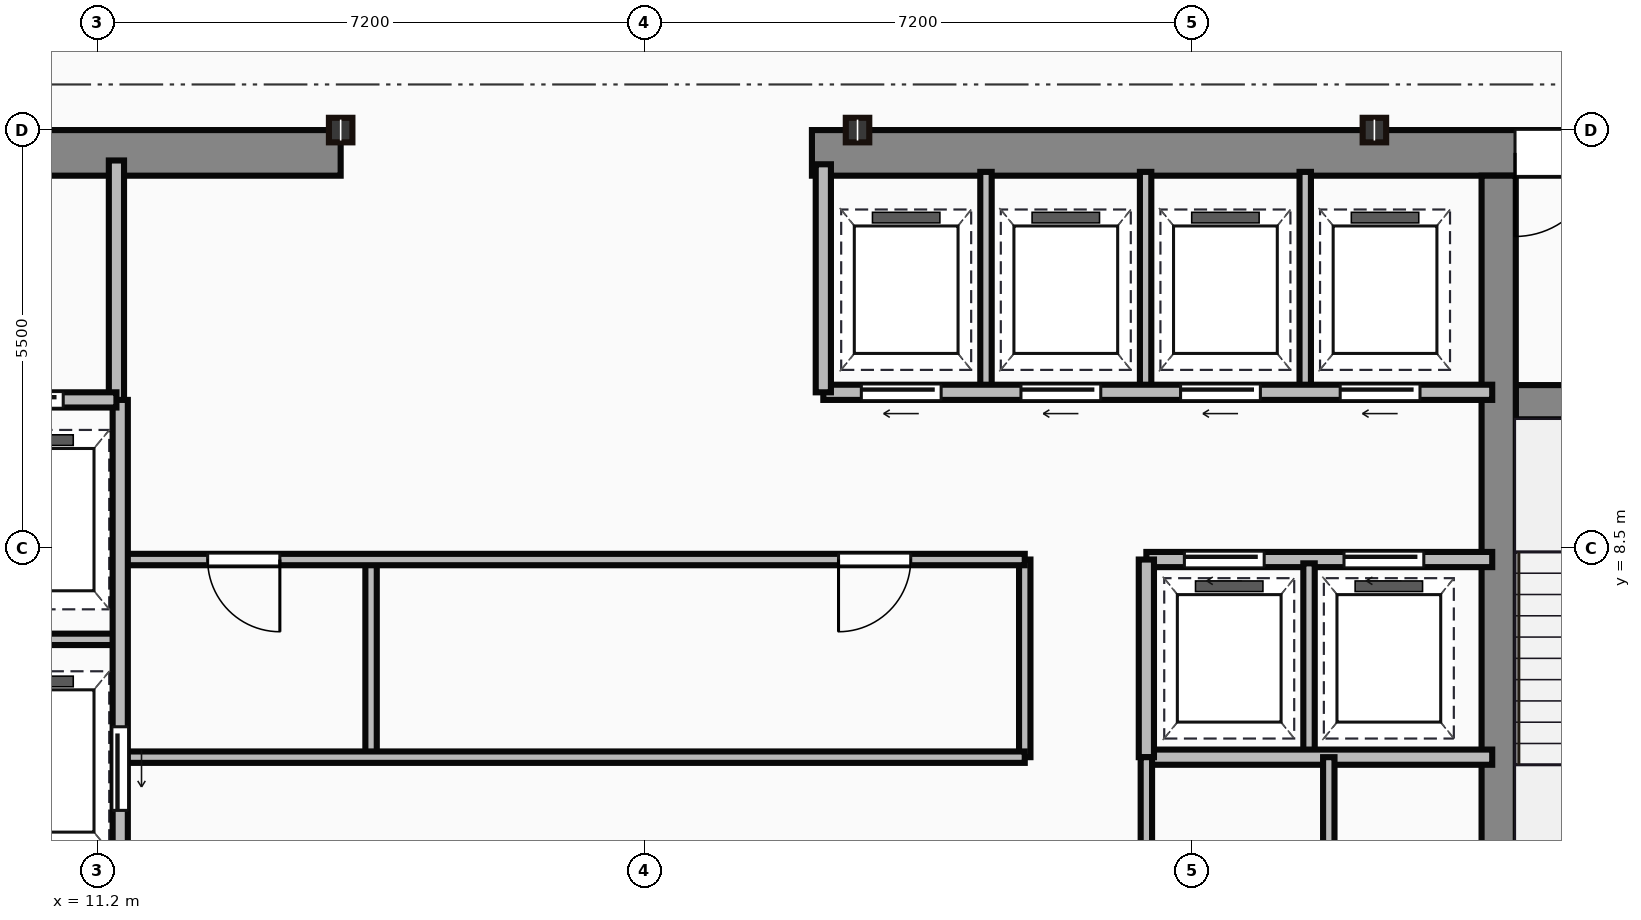
"""IFC4 building model, lengths in metres.
Left out: names, types, materials, properties, quantities, classifications, styles, units other than length and angle.
Written with IfcOpenShell. Run it as: python <this file> out.ifc"""

import sys

from ifc_helpers import new_model, si_unit, direction, frame, frame_2d, origin, origin_2d, place, context, subcontext, project, spatial, rectangle, i_section, extrude, source, transform, mapped, element, fill, save


model = new_model("IFC4")
c1 = context("Model", 3, precision=1e-05, world=origin(), true_north=direction((0.0, 1.0)))
c2 = subcontext(c1, "Body", "Model", "MODEL_VIEW")
j1 = project(units=[si_unit("LENGTHUNIT", "METRE"), si_unit("PLANEANGLEUNIT", "RADIAN")], contexts=[c1])
p1 = place(None, origin())
s1 = spatial("IfcSite", under=j1, at=p1, CompositionType="ELEMENT")
p2 = place(p1, origin())
s2 = spatial("IfcBuilding", under=s1, at=p2, CompositionType="ELEMENT")
p3 = place(p2, frame((0.0, 0.0, 206.85)))
s3 = spatial("IfcBuildingStorey", under=s2, at=p3, CompositionType="ELEMENT", Elevation=206.85)
m1 = source(origin(), c2, "Body", "SweptSolid", [
    extrude(rectangle(XDim=9.1, YDim=0.6, at=frame_2d((4.55, 0.0))), origin(), (0.0, 0.0, 1.0), 3.65),
])
p4 = place(p3, frame((5.3, 13.7, 0.0), z_axis=(0.0, 0.0, 1.0), x_axis=(1.0, 0.0, 0.0)))
e1 = element("IfcWall", 1, at=p4, inside=s3, PredefinedType="SHEAR", context=c2, shape_type="MappedRepresentation", body=[
    mapped(m1, transform((0.0, 0.0, 0.0))),
])
p5 = place(p4, frame((4.1, 0.0, 0.0)))
e2 = element("IfcOpeningElement", 2, at=p5, cuts=e1, PredefinedType="OPENING", context=c2, shape_type="SweptSolid", body=[
    extrude(rectangle(XDim=1.1, YDim=2.15, at=frame_2d((0.55, 1.075))), frame((0.0, 0.31, 0.0), z_axis=(0.0, -1.0, 0.0), x_axis=(1.0, 0.0, 0.0)), (0.0, 0.0, 1.0), 0.62),
])
m2 = source(origin(), c2, "Body", "SweptSolid", [
    extrude(rectangle(XDim=12.6, YDim=0.6, at=frame_2d((6.3, 0.0))), origin(), (0.0, 0.0, 1.0), 3.65),
])
p6 = place(p3, frame((20.6, 13.7, 0.0), z_axis=(0.0, 0.0, 1.0), x_axis=(1.0, 0.0, 0.0)))
e3 = element("IfcWall", 3, at=p6, inside=s3, PredefinedType="SHEAR", context=c2, shape_type="MappedRepresentation", body=[
    mapped(m2, transform((0.0, 0.0, 0.0))),
])
p7 = place(p6, frame((9.25, 0.0, 0.0)))
e4 = element("IfcOpeningElement", 4, at=p7, cuts=e3, PredefinedType="OPENING", context=c2, shape_type="SweptSolid", body=[
    extrude(rectangle(XDim=1.1, YDim=2.15, at=frame_2d((0.55, 1.075))), frame((0.0, 0.31, 0.0), z_axis=(0.0, -1.0, 0.0), x_axis=(1.0, 0.0, 0.0)), (0.0, 0.0, 1.0), 0.62),
])
m3 = source(origin(), c2, "Body", "SweptSolid", [
    extrude(rectangle(XDim=12.5, YDim=0.45, at=frame_2d((6.25, 0.0))), origin(), (0.0, 0.0, 1.0), 3.65),
])
p8 = place(p3, frame((29.635, 0.9, 0.0), z_axis=(0.0, 0.0, 1.0), x_axis=(0.0, 1.0, 0.0)))
e5 = element("IfcWall", 5, at=p8, inside=s3, PredefinedType="SHEAR", context=c2, shape_type="MappedRepresentation", body=[
    mapped(m3, transform((0.0, 0.0, 0.0))),
])
m4 = source(origin(), c2, "Body", "SweptSolid", [
    extrude(rectangle(XDim=3.39, YDim=0.45, at=frame_2d((1.695, 0.0))), origin(), (0.0, 0.0, 1.0), 3.65),
])
p9 = place(p3, frame((29.86, 10.42, 0.0), z_axis=(0.0, 0.0, 1.0), x_axis=(1.0, 0.0, 0.0)))
e6 = element("IfcWall", 6, at=p9, inside=s3, PredefinedType="SHEAR", context=c2, shape_type="MappedRepresentation", body=[
    mapped(m4, transform((0.0, 0.0, 0.0))),
])
p10 = place(p9, frame((1.1, 0.0, 0.0)))
e7 = element("IfcOpeningElement", 7, at=p10, cuts=e6, PredefinedType="OPENING", context=c2, shape_type="SweptSolid", body=[
    extrude(rectangle(XDim=1.1, YDim=2.15, at=frame_2d((0.55, 1.075))), frame((0.0, 0.235, 0.0), z_axis=(0.0, -1.0, 0.0), x_axis=(1.0, 0.0, 0.0)), (0.0, 0.0, 1.0), 0.47),
])
m5 = source(origin(), c2, "Body", "SweptSolid", [
    extrude(i_section(OverallWidth=0.309, OverallDepth=0.323, WebThickness=0.014, FlangeThickness=0.023, at=origin_2d()), origin(), (0.0, 0.0, 1.0), 3.65),
])
for number, where, z_axis, x_axis in (
    (8, (14.4, 14.0, 0.0), (0.0, 0.0, 1.0), (1.0, 0.0, 0.0)),
    (9, (21.2, 14.0, 0.0), (0.0, 0.0, 1.0), (1.0, 0.0, 0.0)),
    (10, (28.0, 14.0, 0.0), (0.0, 0.0, 1.0), (1.0, 0.0, 0.0)),
):
    element("IfcColumn", number, at=place(p3, frame(where, z_axis=z_axis, x_axis=x_axis)), inside=s3, PredefinedType="COLUMN", context=c2, shape_type="MappedRepresentation", body=[
        mapped(m5, transform((0.0, 0.0, 0.0))),
    ])
m6 = source(origin(), c2, "Body", "SweptSolid", [
    extrude(rectangle(XDim=3.18, YDim=0.2, at=frame_2d((1.59, 0.0))), origin(), (0.0, 0.0, 1.0), 3.4),
])
p11 = place(p3, frame((11.45, 10.42, 0.0), z_axis=(0.0, 0.0, 1.0), x_axis=(0.0, 1.0, 0.0)))
e11 = element("IfcWall", 11, at=p11, inside=s3, PredefinedType="PARTITIONING", context=c2, shape_type="MappedRepresentation", body=[
    mapped(m6, transform((0.0, 0.0, 0.0))),
])
m7 = source(origin(), c2, "Body", "SweptSolid", [
    extrude(rectangle(XDim=2.35, YDim=0.2, at=frame_2d((1.175, 0.0))), origin(), (0.0, 0.0, 1.0), 3.4),
])
p12 = place(p3, frame((9.1, 10.45, 0.0), z_axis=(0.0, 0.0, 1.0), x_axis=(1.0, 0.0, 0.0)))
e12 = element("IfcWall", 12, at=p12, inside=s3, PredefinedType="PARTITIONING", context=c2, shape_type="MappedRepresentation", body=[
    mapped(m7, transform((0.0, 0.0, 0.0))),
])
p13 = place(p12, frame((0.55, 0.0, 0.0)))
e13 = element("IfcOpeningElement", 13, at=p13, cuts=e12, PredefinedType="OPENING", context=c2, shape_type="SweptSolid", body=[
    extrude(rectangle(XDim=1.1, YDim=2.15, at=frame_2d((0.55, 1.075))), frame((0.0, 0.11, 0.0), z_axis=(0.0, -1.0, 0.0), x_axis=(1.0, 0.0, 0.0)), (0.0, 0.0, 1.0), 0.22),
])
m8 = source(origin(), c2, "Body", "SweptSolid", [
    extrude(rectangle(XDim=9.6, YDim=0.2, at=frame_2d((4.8, 0.0))), origin(), (0.0, 0.0, 1.0), 3.4),
])
p14 = place(p3, frame((11.5, 0.85, 0.0), z_axis=(0.0, 0.0, 1.0), x_axis=(0.0, 1.0, 0.0)))
e14 = element("IfcWall", 14, at=p14, inside=s3, PredefinedType="PARTITIONING", context=c2, shape_type="MappedRepresentation", body=[
    mapped(m8, transform((0.0, 0.0, 0.0))),
])
p15 = place(p14, frame((4.2, 0.0, 0.0)))
e15 = element("IfcOpeningElement", 15, at=p15, cuts=e14, PredefinedType="OPENING", context=c2, shape_type="SweptSolid", body=[
    extrude(rectangle(XDim=1.1, YDim=2.15, at=frame_2d((0.55, 1.075))), frame((0.0, 0.11, 0.0), z_axis=(0.0, -1.0, 0.0), x_axis=(1.0, 0.0, 0.0)), (0.0, 0.0, 1.0), 0.22),
])
p16 = place(p14, frame((0.9, 0.0, 0.0)))
e16 = element("IfcOpeningElement", 16, at=p16, cuts=e14, PredefinedType="OPENING", context=c2, shape_type="SweptSolid", body=[
    extrude(rectangle(XDim=1.2, YDim=2.15, at=frame_2d((0.6, 1.075))), frame((0.0, 0.11, 0.0), z_axis=(0.0, -1.0, 0.0), x_axis=(1.0, 0.0, 0.0)), (0.0, 0.0, 1.0), 0.22),
])
m9 = source(origin(), c2, "Body", "SweptSolid", [
    extrude(rectangle(XDim=2.4, YDim=0.15, at=frame_2d((1.2, 0.0))), origin(), (0.0, 0.0, 1.0), 3.4),
])
p17 = place(p3, frame((9.1, 7.3, 0.0), z_axis=(0.0, 0.0, 1.0), x_axis=(1.0, 0.0, 0.0)))
e17 = element("IfcWall", 17, at=p17, inside=s3, PredefinedType="PARTITIONING", context=c2, shape_type="MappedRepresentation", body=[
    mapped(m9, transform((0.0, 0.0, 0.0))),
])
m10 = source(origin(), c2, "Body", "SweptSolid", [
    extrude(rectangle(XDim=11.85, YDim=0.15, at=frame_2d((5.925, 0.0))), origin(), (0.0, 0.0, 1.0), 3.4),
])
p18 = place(p3, frame((11.55, 5.75, 0.0), z_axis=(0.0, 0.0, 1.0), x_axis=(1.0, 0.0, 0.0)))
e18 = element("IfcWall", 18, at=p18, inside=s3, PredefinedType="PARTITIONING", context=c2, shape_type="MappedRepresentation", body=[
    mapped(m10, transform((0.0, 0.0, 0.0))),
])
p19 = place(p3, frame((11.55, 8.35, 0.0), z_axis=(0.0, 0.0, 1.0), x_axis=(1.0, 0.0, 0.0)))
e19 = element("IfcWall", 19, at=p19, inside=s3, PredefinedType="PARTITIONING", context=c2, shape_type="MappedRepresentation", body=[
    mapped(m10, transform((0.0, 0.0, 0.0))),
])
p20 = place(p19, frame((1.1, 0.0, 0.0)))
e20 = element("IfcOpeningElement", 20, at=p20, cuts=e19, PredefinedType="OPENING", context=c2, shape_type="SweptSolid", body=[
    extrude(rectangle(XDim=0.95, YDim=2.15, at=frame_2d((0.475, 1.075))), frame((0.0, 0.085, 0.0), z_axis=(0.0, -1.0, 0.0), x_axis=(1.0, 0.0, 0.0)), (0.0, 0.0, 1.0), 0.17),
])
p21 = place(p19, frame((9.4, 0.0, 0.0)))
e21 = element("IfcOpeningElement", 21, at=p21, cuts=e19, PredefinedType="OPENING", context=c2, shape_type="SweptSolid", body=[
    extrude(rectangle(XDim=0.95, YDim=2.15, at=frame_2d((0.475, 1.075))), frame((0.0, 0.085, 0.0), z_axis=(0.0, -1.0, 0.0), x_axis=(1.0, 0.0, 0.0)), (0.0, 0.0, 1.0), 0.17),
])
m11 = source(origin(), c2, "Body", "SweptSolid", [
    extrude(rectangle(XDim=2.6, YDim=0.15, at=frame_2d((1.3, 0.0))), origin(), (0.0, 0.0, 1.0), 3.4),
])
p22 = place(p3, frame((23.4, 5.75, 0.0), z_axis=(0.0, 0.0, 1.0), x_axis=(0.0, 1.0, 0.0)))
e22 = element("IfcWall", 22, at=p22, inside=s3, PredefinedType="PARTITIONING", context=c2, shape_type="MappedRepresentation", body=[
    mapped(m11, transform((0.0, 0.0, 0.0))),
])
m12 = source(origin(), c2, "Body", "SweptSolid", [
    extrude(rectangle(XDim=2.5, YDim=0.15, at=frame_2d((1.25, 0.0))), origin(), (0.0, 0.0, 1.0), 3.4),
])
p23 = place(p3, frame((14.8, 5.8, 0.0), z_axis=(0.0, 0.0, 1.0), x_axis=(0.0, 1.0, 0.0)))
e23 = element("IfcWall", 23, at=p23, inside=s3, PredefinedType="PARTITIONING", context=c2, shape_type="MappedRepresentation", body=[
    mapped(m12, transform((0.0, 0.0, 0.0))),
])
m13 = source(origin(), c2, "Body", "SweptSolid", [
    extrude(rectangle(XDim=8.8, YDim=0.2, at=frame_2d((4.4, 0.0))), origin(), (0.0, 0.0, 1.0), 3.4),
])
p24 = place(p3, frame((20.75, 10.55, 0.0), z_axis=(0.0, 0.0, 1.0), x_axis=(1.0, 0.0, 0.0)))
e24 = element("IfcWall", 24, at=p24, inside=s3, PredefinedType="PARTITIONING", context=c2, shape_type="MappedRepresentation", body=[
    mapped(m13, transform((0.0, 0.0, 0.0))),
])
p25 = place(p24, frame((0.5, 0.0, 0.0)))
e25 = element("IfcOpeningElement", 25, at=p25, cuts=e24, PredefinedType="OPENING", context=c2, shape_type="SweptSolid", body=[
    extrude(rectangle(XDim=1.05, YDim=2.15, at=frame_2d((0.525, 1.075))), frame((0.0, 0.11, 0.0), z_axis=(0.0, -1.0, 0.0), x_axis=(1.0, 0.0, 0.0)), (0.0, 0.0, 1.0), 0.22),
])
p26 = place(p24, frame((2.6, 0.0, 0.0)))
e26 = element("IfcOpeningElement", 26, at=p26, cuts=e24, PredefinedType="OPENING", context=c2, shape_type="SweptSolid", body=[
    extrude(rectangle(XDim=1.05, YDim=2.15, at=frame_2d((0.525, 1.075))), frame((0.0, 0.11, 0.0), z_axis=(0.0, -1.0, 0.0), x_axis=(1.0, 0.0, 0.0)), (0.0, 0.0, 1.0), 0.22),
])
p27 = place(p24, frame((4.7, 0.0, 0.0)))
e27 = element("IfcOpeningElement", 27, at=p27, cuts=e24, PredefinedType="OPENING", context=c2, shape_type="SweptSolid", body=[
    extrude(rectangle(XDim=1.05, YDim=2.15, at=frame_2d((0.525, 1.075))), frame((0.0, 0.11, 0.0), z_axis=(0.0, -1.0, 0.0), x_axis=(1.0, 0.0, 0.0)), (0.0, 0.0, 1.0), 0.22),
])
p28 = place(p24, frame((6.8, 0.0, 0.0)))
e28 = element("IfcOpeningElement", 28, at=p28, cuts=e24, PredefinedType="OPENING", context=c2, shape_type="SweptSolid", body=[
    extrude(rectangle(XDim=1.05, YDim=2.15, at=frame_2d((0.525, 1.075))), frame((0.0, 0.11, 0.0), z_axis=(0.0, -1.0, 0.0), x_axis=(1.0, 0.0, 0.0)), (0.0, 0.0, 1.0), 0.22),
])
m14 = source(origin(), c2, "Body", "SweptSolid", [
    extrude(rectangle(XDim=3.0, YDim=0.2, at=frame_2d((1.5, 0.0))), origin(), (0.0, 0.0, 1.0), 3.4),
])
p29 = place(p3, frame((20.75, 10.55, 0.0), z_axis=(0.0, 0.0, 1.0), x_axis=(0.0, 1.0, 0.0)))
e29 = element("IfcWall", 29, at=p29, inside=s3, PredefinedType="PARTITIONING", context=c2, shape_type="MappedRepresentation", body=[
    mapped(m14, transform((0.0, 0.0, 0.0))),
])
m15 = source(origin(), c2, "Body", "SweptSolid", [
    extrude(rectangle(XDim=2.85, YDim=0.15, at=frame_2d((1.425, 0.0))), origin(), (0.0, 0.0, 1.0), 3.4),
])
for number, where, z_axis, x_axis in (
    (30, (22.89, 10.6, 0.0), (0.0, 0.0, 1.0), (0.0, 1.0, 0.0)),
    (31, (24.99, 10.6, 0.0), (0.0, 0.0, 1.0), (0.0, 1.0, 0.0)),
    (32, (27.09, 10.6, 0.0), (0.0, 0.0, 1.0), (0.0, 1.0, 0.0)),
):
    element("IfcWall", number, at=place(p3, frame(where, z_axis=z_axis, x_axis=x_axis)), inside=s3, PredefinedType="PARTITIONING", context=c2, shape_type="MappedRepresentation", body=[
        mapped(m15, transform((0.0, 0.0, 0.0))),
    ])
m16 = source(origin(), c2, "Body", "SweptSolid", [
    extrude(rectangle(XDim=4.55, YDim=0.2, at=frame_2d((2.275, 0.0))), origin(), (0.0, 0.0, 1.0), 3.4),
])
p30 = place(p3, frame((25.0, 8.35, 0.0), z_axis=(0.0, 0.0, 1.0), x_axis=(1.0, 0.0, 0.0)))
e33 = element("IfcWall", 33, at=p30, inside=s3, PredefinedType="PARTITIONING", context=c2, shape_type="MappedRepresentation", body=[
    mapped(m16, transform((0.0, 0.0, 0.0))),
])
p31 = place(p30, frame((0.5, 0.0, 0.0)))
e34 = element("IfcOpeningElement", 34, at=p31, cuts=e33, PredefinedType="OPENING", context=c2, shape_type="SweptSolid", body=[
    extrude(rectangle(XDim=1.05, YDim=2.15, at=frame_2d((0.525, 1.075))), frame((0.0, 0.11, 0.0), z_axis=(0.0, -1.0, 0.0), x_axis=(1.0, 0.0, 0.0)), (0.0, 0.0, 1.0), 0.22),
])
p32 = place(p30, frame((2.6, 0.0, 0.0)))
e35 = element("IfcOpeningElement", 35, at=p32, cuts=e33, PredefinedType="OPENING", context=c2, shape_type="SweptSolid", body=[
    extrude(rectangle(XDim=1.05, YDim=2.15, at=frame_2d((0.525, 1.075))), frame((0.0, 0.11, 0.0), z_axis=(0.0, -1.0, 0.0), x_axis=(1.0, 0.0, 0.0)), (0.0, 0.0, 1.0), 0.22),
])
p33 = place(p3, frame((25.0, 5.75, 0.0), z_axis=(0.0, 0.0, 1.0), x_axis=(1.0, 0.0, 0.0)))
e36 = element("IfcWall", 36, at=p33, inside=s3, PredefinedType="PARTITIONING", context=c2, shape_type="MappedRepresentation", body=[
    mapped(m16, transform((0.0, 0.0, 0.0))),
])
m17 = source(origin(), c2, "Body", "SweptSolid", [
    extrude(rectangle(XDim=2.6, YDim=0.2, at=frame_2d((1.3, 0.0))), origin(), (0.0, 0.0, 1.0), 3.4),
])
p34 = place(p3, frame((25.0, 5.75, 0.0), z_axis=(0.0, 0.0, 1.0), x_axis=(0.0, 1.0, 0.0)))
e37 = element("IfcWall", 37, at=p34, inside=s3, PredefinedType="PARTITIONING", context=c2, shape_type="MappedRepresentation", body=[
    mapped(m17, transform((0.0, 0.0, 0.0))),
])
p35 = place(p3, frame((27.14, 5.8, 0.0), z_axis=(0.0, 0.0, 1.0), x_axis=(0.0, 1.0, 0.0)))
e38 = element("IfcWall", 38, at=p35, inside=s3, PredefinedType="PARTITIONING", context=c2, shape_type="MappedRepresentation", body=[
    mapped(m12, transform((0.0, 0.0, 0.0))),
])
m18 = source(origin(), c2, "Body", "SweptSolid", [
    extrude(rectangle(XDim=4.9, YDim=0.15, at=frame_2d((2.45, 0.0))), origin(), (0.0, 0.0, 1.0), 3.4),
])
p36 = place(p3, frame((25.0, 0.85, 0.0), z_axis=(0.0, 0.0, 1.0), x_axis=(0.0, 1.0, 0.0)))
e39 = element("IfcWall", 39, at=p36, inside=s3, PredefinedType="PARTITIONING", context=c2, shape_type="MappedRepresentation", body=[
    mapped(m18, transform((0.0, 0.0, 0.0))),
])
p37 = place(p36, frame((2.5, 0.0, 0.0)))
e40 = element("IfcOpeningElement", 40, at=p37, cuts=e39, PredefinedType="OPENING", context=c2, shape_type="SweptSolid", body=[
    extrude(rectangle(XDim=0.95, YDim=2.15, at=frame_2d((0.475, 1.075))), frame((0.0, 0.085, 0.0), z_axis=(0.0, -1.0, 0.0), x_axis=(1.0, 0.0, 0.0)), (0.0, 0.0, 1.0), 0.17),
])
m19 = source(origin(), c2, "Body", "SweptSolid", [
    extrude(rectangle(XDim=3.4, YDim=0.15, at=frame_2d((1.7, 0.0))), origin(), (0.0, 0.0, 1.0), 3.4),
])
p38 = place(p3, frame((27.4, 2.35, 0.0), z_axis=(0.0, 0.0, 1.0), x_axis=(0.0, 1.0, 0.0)))
e41 = element("IfcWall", 41, at=p38, inside=s3, PredefinedType="PARTITIONING", context=c2, shape_type="MappedRepresentation", body=[
    mapped(m19, transform((0.0, 0.0, 0.0))),
])
p39 = place(p38, frame((1.1, 0.0, 0.0)))
e42 = element("IfcOpeningElement", 42, at=p39, cuts=e41, PredefinedType="OPENING", context=c2, shape_type="SweptSolid", body=[
    extrude(rectangle(XDim=0.85, YDim=2.1, at=frame_2d((0.425, 1.05))), frame((0.0, 0.085, 0.0), z_axis=(0.0, -1.0, 0.0), x_axis=(1.0, 0.0, 0.0)), (0.0, 0.0, 1.0), 0.17),
])
m20 = source(origin(), c2, "Body", "SweptSolid", [
    extrude(rectangle(XDim=1.1, YDim=2.15, at=frame_2d((0.55, 1.075))), frame((0.0, 0.025, 0.0), z_axis=(0.0, -1.0, 0.0), x_axis=(1.0, 0.0, 0.0)), (0.0, 0.0, 1.0), 0.05),
])
p40 = place(p7, origin())
e43 = element("IfcDoor", 43, at=p40, inside=s3, OperationType="SINGLE_SWING_LEFT", PredefinedType="DOOR", context=c2, shape_type="MappedRepresentation", body=[
    mapped(m20, transform((0.0, 0.0, 0.0))),
])
fill(e4, e43)
p41 = place(p13, origin())
e44 = element("IfcDoor", 44, at=p41, inside=s3, OperationType="SLIDING_TO_LEFT", PredefinedType="DOOR", context=c2, shape_type="MappedRepresentation", body=[
    mapped(m20, transform((0.0, 0.0, 0.0))),
])
fill(e13, e44)
p42 = place(p15, frame((1.1, 0.0, 0.0), z_axis=(0.0, 0.0, 1.0), x_axis=(-1.0, 0.0, 0.0)))
e45 = element("IfcDoor", 45, at=p42, inside=s3, OperationType="SLIDING_TO_LEFT", PredefinedType="DOOR", context=c2, shape_type="MappedRepresentation", body=[
    mapped(m20, transform((0.0, 0.0, 0.0))),
])
fill(e15, e45)
m21 = source(origin(), c2, "Body", "SweptSolid", [
    extrude(rectangle(XDim=0.95, YDim=2.15, at=frame_2d((0.475, 1.075))), frame((0.0, 0.025, 0.0), z_axis=(0.0, -1.0, 0.0), x_axis=(1.0, 0.0, 0.0)), (0.0, 0.0, 1.0), 0.05),
])
p43 = place(p20, origin())
e46 = element("IfcDoor", 46, at=p43, inside=s3, OperationType="SINGLE_SWING_RIGHT", PredefinedType="DOOR", context=c2, shape_type="MappedRepresentation", body=[
    mapped(m21, transform((0.0, 0.0, 0.0))),
])
fill(e20, e46)
p44 = place(p21, origin())
e47 = element("IfcDoor", 47, at=p44, inside=s3, OperationType="SINGLE_SWING_LEFT", PredefinedType="DOOR", context=c2, shape_type="MappedRepresentation", body=[
    mapped(m21, transform((0.0, 0.0, 0.0))),
])
fill(e21, e47)
m22 = source(origin(), c2, "Body", "SweptSolid", [
    extrude(rectangle(XDim=1.05, YDim=2.15, at=frame_2d((0.525, 1.075))), frame((0.0, 0.025, 0.0), z_axis=(0.0, -1.0, 0.0), x_axis=(1.0, 0.0, 0.0)), (0.0, 0.0, 1.0), 0.05),
])
p45 = place(p25, frame((1.05, 0.0, 0.0), z_axis=(0.0, 0.0, 1.0), x_axis=(-1.0, 0.0, 0.0)))
e48 = element("IfcDoor", 48, at=p45, inside=s3, OperationType="SLIDING_TO_LEFT", PredefinedType="DOOR", context=c2, shape_type="MappedRepresentation", body=[
    mapped(m22, transform((0.0, 0.0, 0.0))),
])
fill(e25, e48)
p46 = place(p26, frame((1.05, 0.0, 0.0), z_axis=(0.0, 0.0, 1.0), x_axis=(-1.0, 0.0, 0.0)))
e49 = element("IfcDoor", 49, at=p46, inside=s3, OperationType="SLIDING_TO_LEFT", PredefinedType="DOOR", context=c2, shape_type="MappedRepresentation", body=[
    mapped(m22, transform((0.0, 0.0, 0.0))),
])
fill(e26, e49)
p47 = place(p27, frame((1.05, 0.0, 0.0), z_axis=(0.0, 0.0, 1.0), x_axis=(-1.0, 0.0, 0.0)))
e50 = element("IfcDoor", 50, at=p47, inside=s3, OperationType="SLIDING_TO_LEFT", PredefinedType="DOOR", context=c2, shape_type="MappedRepresentation", body=[
    mapped(m22, transform((0.0, 0.0, 0.0))),
])
fill(e27, e50)
p48 = place(p28, frame((1.05, 0.0, 0.0), z_axis=(0.0, 0.0, 1.0), x_axis=(-1.0, 0.0, 0.0)))
e51 = element("IfcDoor", 51, at=p48, inside=s3, OperationType="SLIDING_TO_LEFT", PredefinedType="DOOR", context=c2, shape_type="MappedRepresentation", body=[
    mapped(m22, transform((0.0, 0.0, 0.0))),
])
fill(e28, e51)
p49 = place(p31, origin())
e52 = element("IfcDoor", 52, at=p49, inside=s3, OperationType="SLIDING_TO_LEFT", PredefinedType="DOOR", context=c2, shape_type="MappedRepresentation", body=[
    mapped(m22, transform((0.0, 0.0, 0.0))),
])
fill(e34, e52)
p50 = place(p32, origin())
e53 = element("IfcDoor", 53, at=p50, inside=s3, OperationType="SLIDING_TO_LEFT", PredefinedType="DOOR", context=c2, shape_type="MappedRepresentation", body=[
    mapped(m22, transform((0.0, 0.0, 0.0))),
])
fill(e35, e53)
save(model, sys.argv[1])
